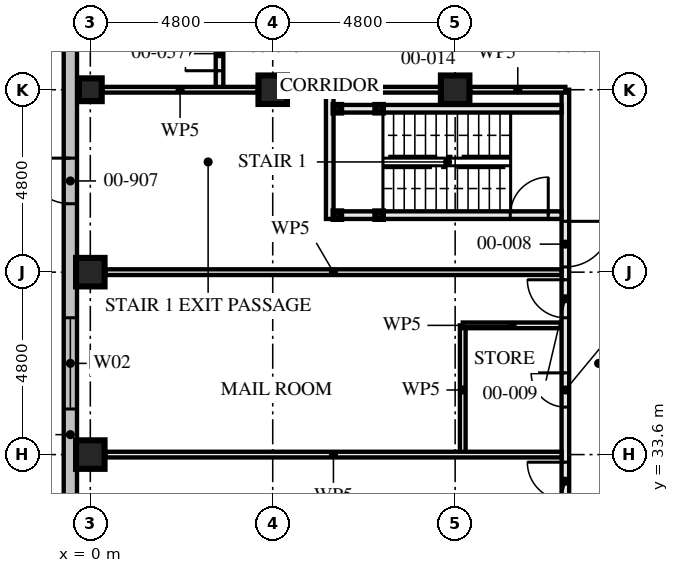
"""IFC4 building model, lengths in metres.
Left out: names, types, materials, properties, quantities, classifications, styles, units other than length and angle.
Written with IfcOpenShell. Run it as: python <this file> out.ifc"""

import sys

from ifc_helpers import new_model, si_unit, direction, frame, frame_2d, origin, origin_2d, place, context, subcontext, project, spatial, rectangle, hollow_rectangle, extrude, element, fill, save


model = new_model("IFC4")
c1 = context("Model", 3, precision=1e-05, world=origin(), true_north=direction((0.0, 1.0)))
c2 = subcontext(c1, "Body", "Model", "MODEL_VIEW")
j1 = project(units=[si_unit("LENGTHUNIT", "METRE"), si_unit("PLANEANGLEUNIT", "RADIAN")], contexts=[c1])
p1 = place(None, origin())
s1 = spatial("IfcSite", under=j1, at=p1, CompositionType="ELEMENT")
p2 = place(p1, origin())
s2 = spatial("IfcBuilding", under=s1, at=p2, CompositionType="ELEMENT")
p3 = place(p2, origin())
s3 = spatial("IfcBuildingStorey", under=s2, at=p3, CompositionType="ELEMENT", Elevation=0.0)
for number, where, z_axis, x_axis in (
    (1, (0.0, 33.6, 0.0), (0.0, 0.0, 1.0), (1.0, 0.0, 0.0)),
    (2, (0.0, 38.4, 0.0), (0.0, 0.0, 1.0), (1.0, 0.0, 0.0)),
):
    element("IfcColumn", number, at=place(p3, frame(where, z_axis=z_axis, x_axis=x_axis)), inside=s3, PredefinedType="COLUMN", context=c2, shape_type="SweptSolid", body=[
        extrude(hollow_rectangle(XDim=0.75, YDim=0.75, WallThickness=0.08, at=origin_2d()), origin(), (0.0, 0.0, 1.0), 4.5),
    ])
p4 = place(p3, frame((0.0, 43.2, 0.0), z_axis=(0.0, 0.0, 1.0), x_axis=(0.0, 1.0, 0.0)))
e3 = element("IfcColumn", 3, at=p4, inside=s3, PredefinedType="COLUMN", context=c2, shape_type="SweptSolid", body=[
    extrude(hollow_rectangle(XDim=0.6, YDim=0.6, WallThickness=0.08, at=origin_2d()), origin(), (0.0, 0.0, 1.0), 4.5),
])
for number, where, z_axis, x_axis in (
    (4, (4.8, 43.2, 0.0), (0.0, 0.0, 1.0), (0.0, 1.0, 0.0)),
    (5, (9.6, 43.2, 0.0), (0.0, 0.0, 1.0), (0.0, 1.0, 0.0)),
):
    element("IfcColumn", number, at=place(p3, frame(where, z_axis=z_axis, x_axis=x_axis)), inside=s3, PredefinedType="COLUMN", context=c2, shape_type="SweptSolid", body=[
        extrude(hollow_rectangle(XDim=0.75, YDim=0.75, WallThickness=0.08, at=origin_2d()), origin(), (0.0, 0.0, 1.0), 4.5),
    ])
for number, where, z_axis, x_axis in (
    (6, (6.5, 42.7, 0.0), (0.0, 0.0, 1.0), (1.0, 0.0, 0.0)),
    (7, (6.5, 39.9, 0.0), (0.0, 0.0, 1.0), (1.0, 0.0, 0.0)),
    (8, (7.6, 42.7, 0.0), (0.0, 0.0, 1.0), (1.0, 0.0, 0.0)),
    (9, (7.6, 39.9, 0.0), (0.0, 0.0, 1.0), (1.0, 0.0, 0.0)),
):
    element("IfcColumn", number, at=place(p3, frame(where, z_axis=z_axis, x_axis=x_axis)), inside=s3, PredefinedType="COLUMN", context=c2, shape_type="SweptSolid", body=[
        extrude(hollow_rectangle(XDim=0.2, YDim=0.2, WallThickness=0.008, at=origin_2d()), origin(), (0.0, 0.0, 1.0), 4.33),
    ])
p5 = place(p3, frame((-0.525, 53.325, 0.0), z_axis=(0.0, 0.0, 1.0), x_axis=(0.0, -1.0, 0.0)))
e10 = element("IfcWall", 10, at=p5, inside=s3, PredefinedType="SOLIDWALL", context=c2, shape_type="SweptSolid", body=[
    extrude(rectangle(XDim=38.4, YDim=0.35, at=frame_2d((19.2, 0.0))), origin(), (0.0, 0.0, 1.0), 4.5),
])
p6 = place(p5, frame((11.925, 0.0, 0.0)))
e11 = element("IfcOpeningElement", 11, at=p6, cuts=e10, PredefinedType="OPENING", context=c2, shape_type="SweptSolid", body=[
    extrude(rectangle(XDim=1.2, YDim=2.4, at=frame_2d((0.6, 1.2))), frame((0.0, 0.186, 0.0), z_axis=(0.0, -1.0, 0.0), x_axis=(1.0, 0.0, 0.0)), (0.0, 0.0, 1.0), 0.371),
])
p7 = place(p5, frame((24.825, 0.0, 0.0)))
e12 = element("IfcOpeningElement", 12, at=p7, cuts=e10, PredefinedType="OPENING", context=c2, shape_type="SweptSolid", body=[
    extrude(rectangle(XDim=1.2, YDim=2.4, at=frame_2d((0.6, 1.2))), frame((0.0, 0.186, 0.0), z_axis=(0.0, -1.0, 0.0), x_axis=(1.0, 0.0, 0.0)), (0.0, 0.0, 1.0), 0.371),
])
p8 = place(p5, frame((35.325, 0.0, 0.9)))
e13 = element("IfcOpeningElement", 13, at=p8, cuts=e10, PredefinedType="OPENING", context=c2, shape_type="SweptSolid", body=[
    extrude(rectangle(XDim=2.4, YDim=2.4, at=frame_2d((1.2, 1.2))), frame((0.0, 0.186, 0.0), z_axis=(0.0, -1.0, 0.0), x_axis=(1.0, 0.0, 0.0)), (0.0, 0.0, 1.0), 0.371),
])
p9 = place(p5, frame((30.525, 0.0, 0.9)))
e14 = element("IfcOpeningElement", 14, at=p9, cuts=e10, PredefinedType="OPENING", context=c2, shape_type="SweptSolid", body=[
    extrude(rectangle(XDim=2.4, YDim=2.4, at=frame_2d((1.2, 1.2))), frame((0.0, 0.186, 0.0), z_axis=(0.0, -1.0, 0.0), x_axis=(1.0, 0.0, 0.0)), (0.0, 0.0, 1.0), 0.371),
])
p10 = place(p5, frame((20.925, 0.0, 0.9)))
e15 = element("IfcOpeningElement", 15, at=p10, cuts=e10, PredefinedType="OPENING", context=c2, shape_type="SweptSolid", body=[
    extrude(rectangle(XDim=2.4, YDim=2.4, at=frame_2d((1.2, 1.2))), frame((0.0, 0.186, 0.0), z_axis=(0.0, -1.0, 0.0), x_axis=(1.0, 0.0, 0.0)), (0.0, 0.0, 1.0), 0.371),
])
p11 = place(p5, frame((16.125, 0.0, 0.9)))
e16 = element("IfcOpeningElement", 16, at=p11, cuts=e10, PredefinedType="OPENING", context=c2, shape_type="SweptSolid", body=[
    extrude(rectangle(XDim=2.4, YDim=2.4, at=frame_2d((1.2, 1.2))), frame((0.0, 0.186, 0.0), z_axis=(0.0, -1.0, 0.0), x_axis=(1.0, 0.0, 0.0)), (0.0, 0.0, 1.0), 0.371),
])
p12 = place(p5, frame((6.525, 0.0, 0.9)))
e17 = element("IfcOpeningElement", 17, at=p12, cuts=e10, PredefinedType="OPENING", context=c2, shape_type="SweptSolid", body=[
    extrude(rectangle(XDim=2.4, YDim=2.4, at=frame_2d((1.2, 1.2))), frame((0.0, 0.186, 0.0), z_axis=(0.0, -1.0, 0.0), x_axis=(1.0, 0.0, 0.0)), (0.0, 0.0, 1.0), 0.371),
])
p13 = place(p5, frame((1.725, 0.0, 0.9)))
e18 = element("IfcOpeningElement", 18, at=p13, cuts=e10, PredefinedType="OPENING", context=c2, shape_type="SweptSolid", body=[
    extrude(rectangle(XDim=2.4, YDim=2.4, at=frame_2d((1.2, 1.2))), frame((0.0, 0.186, 0.0), z_axis=(0.0, -1.0, 0.0), x_axis=(1.0, 0.0, 0.0)), (0.0, 0.0, 1.0), 0.371),
])
p14 = place(p3, frame((6.6, 42.7, 0.0), z_axis=(0.0, 0.0, 1.0), x_axis=(1.0, 0.0, 0.0)))
e19 = element("IfcWall", 19, at=p14, inside=s3, PredefinedType="SOLIDWALL", context=c2, shape_type="SweptSolid", body=[
    extrude(rectangle(XDim=0.9, YDim=0.2, at=frame_2d((0.45, 0.0))), origin(), (0.0, 0.0, 1.0), 3.99),
])
p15 = place(p3, frame((7.7, 42.7, 0.0), z_axis=(0.0, 0.0, 1.0), x_axis=(1.0, 0.0, 0.0)))
e20 = element("IfcWall", 20, at=p15, inside=s3, PredefinedType="SOLIDWALL", context=c2, shape_type="SweptSolid", body=[
    extrude(rectangle(XDim=4.7, YDim=0.2, at=frame_2d((2.35, 0.0))), origin(), (0.0, 0.0, 1.0), 3.99),
])
p16 = place(p3, frame((6.6, 39.9, 0.0), z_axis=(0.0, 0.0, 1.0), x_axis=(1.0, 0.0, 0.0)))
e21 = element("IfcWall", 21, at=p16, inside=s3, PredefinedType="SOLIDWALL", context=c2, shape_type="SweptSolid", body=[
    extrude(rectangle(XDim=0.9, YDim=0.2, at=frame_2d((0.45, 0.0))), origin(), (0.0, 0.0, 1.0), 3.99),
])
p17 = place(p3, frame((7.7, 39.9, 0.0), z_axis=(0.0, 0.0, 1.0), x_axis=(1.0, 0.0, 0.0)))
e22 = element("IfcWall", 22, at=p17, inside=s3, PredefinedType="SOLIDWALL", context=c2, shape_type="SweptSolid", body=[
    extrude(rectangle(XDim=4.7, YDim=0.2, at=frame_2d((2.35, 0.0))), origin(), (0.0, 0.0, 1.0), 3.99),
])
p18 = place(p17, frame((3.35, 0.0, 0.0)))
e23 = element("IfcOpeningElement", 23, at=p18, cuts=e22, PredefinedType="OPENING", context=c2, shape_type="SweptSolid", body=[
    extrude(rectangle(XDim=1.0, YDim=2.1, at=frame_2d((0.5, 1.05))), frame((0.0, 0.111, 0.0), z_axis=(0.0, -1.0, 0.0), x_axis=(1.0, 0.0, 0.0)), (0.0, 0.0, 1.0), 0.221),
])
p19 = place(p3, frame((6.3, 43.125, 0.0), z_axis=(0.0, 0.0, 1.0), x_axis=(0.0, -1.0, 0.0)))
e24 = element("IfcWall", 24, at=p19, inside=s3, PredefinedType="SOLIDWALL", context=c2, shape_type="SweptSolid", body=[
    extrude(rectangle(XDim=3.325, YDim=0.2, at=frame_2d((1.663, 0.0))), origin(), (0.0, 0.0, 1.0), 4.33),
])
p20 = place(p3, frame((9.8, 37.0, 0.0), z_axis=(0.0, 0.0, 1.0), x_axis=(1.0, 0.0, 0.0)))
e25 = element("IfcWall", 25, at=p20, inside=s3, PredefinedType="PARTITIONING", context=c2, shape_type="SweptSolid", body=[
    extrude(rectangle(XDim=2.6, YDim=0.15, at=frame_2d((1.3, 0.0))), origin(), (0.0, 0.0, 1.0), 4.33),
])
p21 = place(p3, frame((9.8, 37.0, 0.0), z_axis=(0.0, 0.0, 1.0), x_axis=(0.0, -1.0, 0.0)))
e26 = element("IfcWall", 26, at=p21, inside=s3, PredefinedType="PARTITIONING", context=c2, shape_type="SweptSolid", body=[
    extrude(rectangle(XDim=3.4, YDim=0.15, at=frame_2d((1.7, 0.0))), origin(), (0.0, 0.0, 1.0), 4.33),
])
for number, where, z_axis, x_axis in (
    (27, (0.395, 38.4, 0.0), (0.0, 0.0, 1.0), (1.0, 0.0, 0.0)),
    (28, (0.395, 33.6, 0.0), (0.0, 0.0, 1.0), (1.0, 0.0, 0.0)),
):
    element("IfcWall", number, at=place(p3, frame(where, z_axis=z_axis, x_axis=x_axis)), inside=s3, PredefinedType="PARTITIONING", context=c2, shape_type="SweptSolid", body=[
        extrude(rectangle(XDim=12.005, YDim=0.15, at=frame_2d((6.002, 0.0))), origin(), (0.0, 0.0, 1.0), 3.55),
    ])
p22 = place(p3, frame((12.5, 43.2, 0.0), z_axis=(0.0, 0.0, 1.0), x_axis=(0.0, -1.0, 0.0)))
e29 = element("IfcWall", 29, at=p22, inside=s3, PredefinedType="PARTITIONING", context=c2, shape_type="SweptSolid", body=[
    extrude(rectangle(XDim=14.4, YDim=0.2, at=frame_2d((7.2, 0.0))), origin(), (0.0, 0.0, 1.0), 3.55),
])
p23 = place(p22, frame((3.462, 0.0, 0.0)))
e30 = element("IfcOpeningElement", 30, at=p23, cuts=e29, PredefinedType="OPENING", context=c2, shape_type="SweptSolid", body=[
    extrude(rectangle(XDim=1.2, YDim=2.4, at=frame_2d((0.6, 1.2))), frame((0.0, 0.111, 0.0), z_axis=(0.0, -1.0, 0.0), x_axis=(1.0, 0.0, 0.0)), (0.0, 0.0, 1.0), 0.221),
])
p24 = place(p22, frame((5.0, 0.0, 0.0)))
e31 = element("IfcOpeningElement", 31, at=p24, cuts=e29, PredefinedType="OPENING", context=c2, shape_type="SweptSolid", body=[
    extrude(rectangle(XDim=1.0, YDim=2.4, at=frame_2d((0.5, 1.2))), frame((0.0, 0.111, 0.0), z_axis=(0.0, -1.0, 0.0), x_axis=(1.0, 0.0, 0.0)), (0.0, 0.0, 1.0), 0.221),
])
p25 = place(p22, frame((9.8, 0.0, 0.0)))
e32 = element("IfcOpeningElement", 32, at=p25, cuts=e29, PredefinedType="OPENING", context=c2, shape_type="SweptSolid", body=[
    extrude(rectangle(XDim=1.0, YDim=2.4, at=frame_2d((0.5, 1.2))), frame((0.0, 0.111, 0.0), z_axis=(0.0, -1.0, 0.0), x_axis=(1.0, 0.0, 0.0)), (0.0, 0.0, 1.0), 0.221),
])
p26 = place(p22, frame((7.45, 0.0, 0.0)))
e33 = element("IfcOpeningElement", 33, at=p26, cuts=e29, PredefinedType="OPENING", context=c2, shape_type="SweptSolid", body=[
    extrude(rectangle(XDim=0.9, YDim=2.1, at=frame_2d((0.45, 1.05))), frame((0.0, 0.111, 0.0), z_axis=(0.0, -1.0, 0.0), x_axis=(1.0, 0.0, 0.0)), (0.0, 0.0, 1.0), 0.221),
])
p27 = place(p22, frame((12.2, 0.0, 0.0)))
e34 = element("IfcOpeningElement", 34, at=p27, cuts=e29, PredefinedType="OPENING", context=c2, shape_type="SweptSolid", body=[
    extrude(rectangle(XDim=1.0, YDim=2.1, at=frame_2d((0.5, 1.05))), frame((0.0, 0.111, 0.0), z_axis=(0.0, -1.0, 0.0), x_axis=(1.0, 0.0, 0.0)), (0.0, 0.0, 1.0), 0.221),
])
p28 = place(p3, frame((12.5, 43.2, 0.0), z_axis=(0.0, 0.0, 1.0), x_axis=(-1.0, 0.0, 0.0)))
e35 = element("IfcWall", 35, at=p28, inside=s3, PredefinedType="PARTITIONING", context=c2, shape_type="SweptSolid", body=[
    extrude(rectangle(XDim=2.505, YDim=0.15, at=frame_2d((1.252, 0.0))), origin(), (0.0, 0.0, 1.0), 3.32),
])
p29 = place(p3, frame((9.205, 43.2, 0.0), z_axis=(0.0, 0.0, 1.0), x_axis=(-1.0, 0.0, 0.0)))
e36 = element("IfcWall", 36, at=p29, inside=s3, PredefinedType="PARTITIONING", context=c2, shape_type="SweptSolid", body=[
    extrude(rectangle(XDim=4.01, YDim=0.15, at=frame_2d((2.005, 0.0))), origin(), (0.0, 0.0, 1.0), 3.32),
])
p30 = place(p3, frame((4.405, 43.2, 0.0), z_axis=(0.0, 0.0, 1.0), x_axis=(-1.0, 0.0, 0.0)))
e37 = element("IfcWall", 37, at=p30, inside=s3, PredefinedType="PARTITIONING", context=c2, shape_type="SweptSolid", body=[
    extrude(rectangle(XDim=4.085, YDim=0.15, at=frame_2d((2.042, 0.0))), origin(), (0.0, 0.0, 1.0), 3.32),
])
p31 = place(p3, frame((3.4, 45.1, 0.0), z_axis=(0.0, 0.0, 1.0), x_axis=(0.0, -1.0, 0.0)))
e38 = element("IfcWall", 38, at=p31, inside=s3, PredefinedType="PARTITIONING", context=c2, shape_type="SweptSolid", body=[
    extrude(rectangle(XDim=1.9, YDim=0.2, at=frame_2d((0.95, 0.0))), origin(), (0.0, 0.0, 1.0), 4.33),
])
p32 = place(p31, frame((0.5, 0.0, 0.0)))
e39 = element("IfcOpeningElement", 39, at=p32, cuts=e38, PredefinedType="OPENING", context=c2, shape_type="SweptSolid", body=[
    extrude(rectangle(XDim=0.9, YDim=2.1, at=frame_2d((0.45, 1.05))), frame((0.0, 0.111, 0.0), z_axis=(0.0, -1.0, 0.0), x_axis=(1.0, 0.0, 0.0)), (0.0, 0.0, 1.0), 0.221),
])
p33 = place(p6, frame((1.2, 0.0, 0.0), z_axis=(0.0, 0.0, 1.0), x_axis=(-1.0, 0.0, 0.0)))
e40 = element("IfcDoor", 40, at=p33, inside=s3, OperationType="SINGLE_SWING_LEFT", PredefinedType="DOOR", context=c2, shape_type="SweptSolid", body=[
    extrude(rectangle(XDim=1.2, YDim=2.4, at=frame_2d((0.6, 1.2))), frame((0.0, 0.027, 0.0), z_axis=(0.0, -1.0, 0.0), x_axis=(1.0, 0.0, 0.0)), (0.0, 0.0, 1.0), 0.054),
])
fill(e11, e40)
p34 = place(p11, origin())
e41 = element("IfcWindow", 41, at=p34, inside=s3, PartitioningType="SINGLE_PANEL", PredefinedType="WINDOW", context=c2, shape_type="SweptSolid", body=[
    extrude(rectangle(XDim=2.4, YDim=2.4, at=frame_2d((1.2, 1.2))), frame((0.0, 0.03, 0.0), z_axis=(0.0, -1.0, 0.0), x_axis=(1.0, 0.0, 0.0)), (0.0, 0.0, 1.0), 0.06),
])
fill(e16, e41)
p35 = place(p18, origin())
e42 = element("IfcDoor", 42, at=p35, inside=s3, OperationType="SINGLE_SWING_LEFT", PredefinedType="DOOR", context=c2, shape_type="SweptSolid", body=[
    extrude(rectangle(XDim=1.0, YDim=2.1, at=frame_2d((0.5, 1.05))), frame((0.0, 0.032, 0.0), z_axis=(0.0, -1.0, 0.0), x_axis=(1.0, 0.0, 0.0)), (0.0, 0.0, 1.0), 0.064),
])
fill(e23, e42)
p36 = place(p23, origin())
e43 = element("IfcDoor", 43, at=p36, inside=s3, OperationType="SINGLE_SWING_RIGHT", PredefinedType="DOOR", context=c2, shape_type="SweptSolid", body=[
    extrude(rectangle(XDim=1.2, YDim=2.4, at=frame_2d((0.6, 1.2))), frame((0.0, 0.027, 0.0), z_axis=(0.0, -1.0, 0.0), x_axis=(1.0, 0.0, 0.0)), (0.0, 0.0, 1.0), 0.054),
])
fill(e30, e43)
p37 = place(p24, frame((1.0, 0.0, 0.0), z_axis=(0.0, 0.0, 1.0), x_axis=(-1.0, 0.0, 0.0)))
e44 = element("IfcDoor", 44, at=p37, inside=s3, OperationType="SINGLE_SWING_LEFT", PredefinedType="DOOR", context=c2, shape_type="SweptSolid", body=[
    extrude(rectangle(XDim=1.0, YDim=2.4, at=frame_2d((0.5, 1.2))), frame((0.0, 0.027, 0.0), z_axis=(0.0, -1.0, 0.0), x_axis=(1.0, 0.0, 0.0)), (0.0, 0.0, 1.0), 0.054),
])
fill(e31, e44)
p38 = place(p25, frame((1.0, 0.0, 0.0), z_axis=(0.0, 0.0, 1.0), x_axis=(-1.0, 0.0, 0.0)))
e45 = element("IfcDoor", 45, at=p38, inside=s3, OperationType="SINGLE_SWING_LEFT", PredefinedType="DOOR", context=c2, shape_type="SweptSolid", body=[
    extrude(rectangle(XDim=1.0, YDim=2.4, at=frame_2d((0.5, 1.2))), frame((0.0, 0.027, 0.0), z_axis=(0.0, -1.0, 0.0), x_axis=(1.0, 0.0, 0.0)), (0.0, 0.0, 1.0), 0.054),
])
fill(e32, e45)
p39 = place(p26, frame((0.9, 0.0, 0.0), z_axis=(0.0, 0.0, 1.0), x_axis=(-1.0, 0.0, 0.0)))
e46 = element("IfcDoor", 46, at=p39, inside=s3, OperationType="SINGLE_SWING_LEFT", PredefinedType="DOOR", context=c2, shape_type="SweptSolid", body=[
    extrude(rectangle(XDim=0.9, YDim=2.1, at=frame_2d((0.45, 1.05))), frame((0.0, 0.027, 0.0), z_axis=(0.0, -1.0, 0.0), x_axis=(1.0, 0.0, 0.0)), (0.0, 0.0, 1.0), 0.054),
])
fill(e33, e46)
p40 = place(p32, frame((0.9, 0.0, 0.0), z_axis=(0.0, 0.0, 1.0), x_axis=(-1.0, 0.0, 0.0)))
e47 = element("IfcDoor", 47, at=p40, inside=s3, OperationType="SINGLE_SWING_RIGHT", PredefinedType="DOOR", context=c2, shape_type="SweptSolid", body=[
    extrude(rectangle(XDim=0.9, YDim=2.1, at=frame_2d((0.45, 1.05))), frame((0.0, 0.027, 0.0), z_axis=(0.0, -1.0, 0.0), x_axis=(1.0, 0.0, 0.0)), (0.0, 0.0, 1.0), 0.054),
])
fill(e39, e47)
save(model, sys.argv[1])
